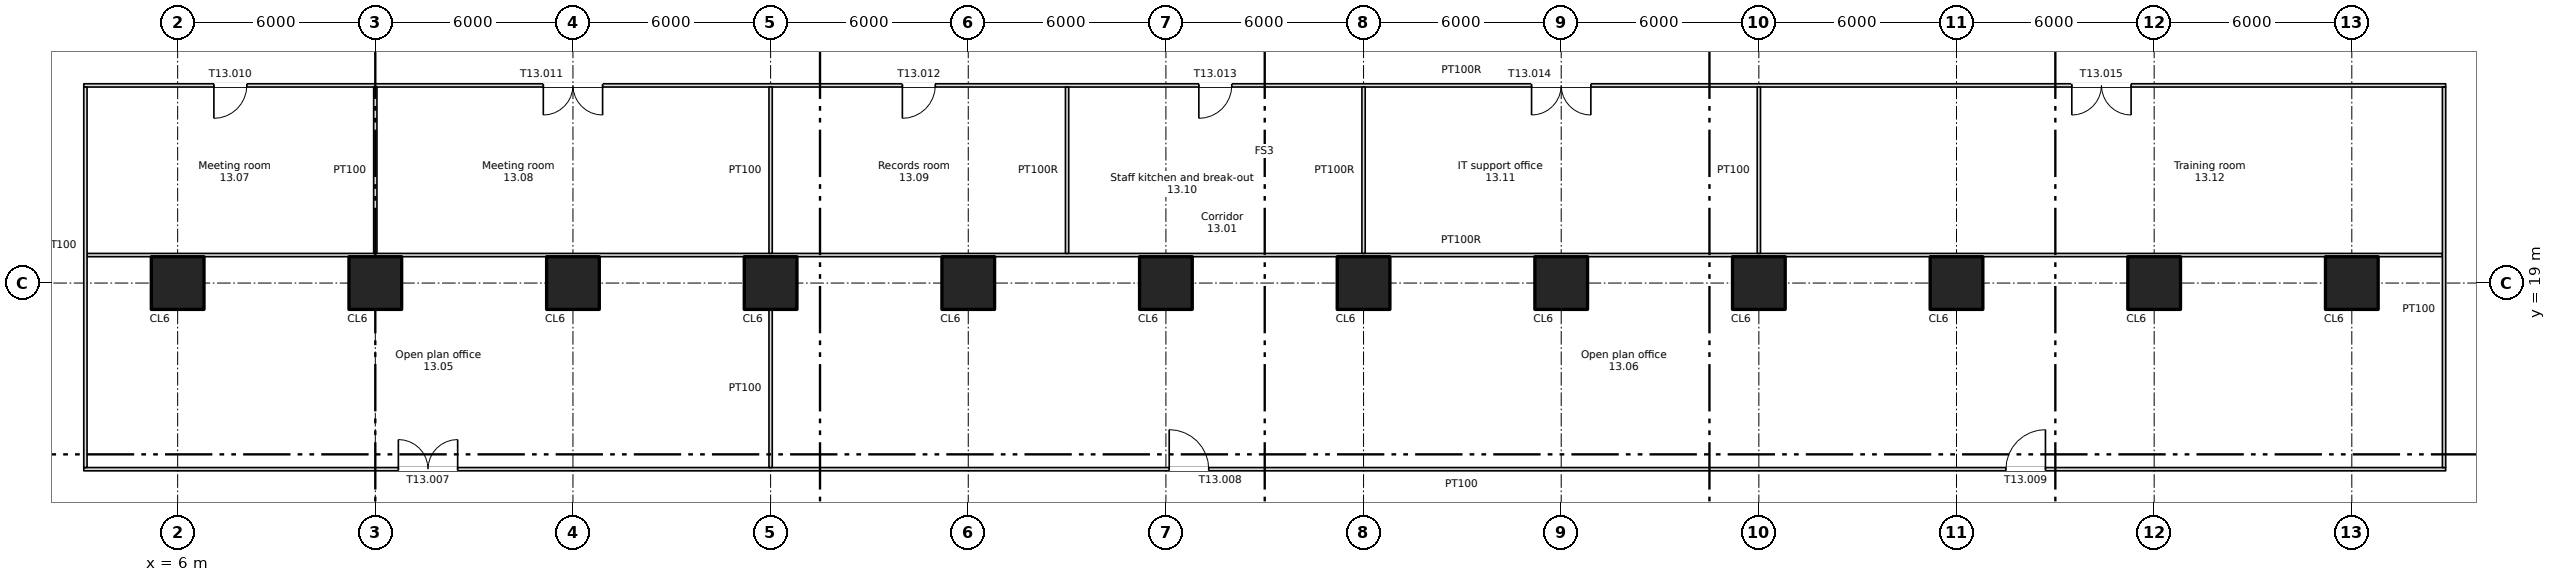
"""IFC4 building model, lengths in metres.
Left out: names, types, materials, properties, quantities, classifications, styles, units other than length and angle.
Written with IfcOpenShell. Run it as: python <this file> out.ifc"""

import sys

from ifc_helpers import new_model, si_unit, direction, frame, frame_2d, origin, origin_2d, place, context, subcontext, project, spatial, rectangle, extrude, element, fill, save


model = new_model("IFC4")
c1 = context("Model", 3, precision=1e-05, world=origin(), true_north=direction((0.0, 1.0)))
c2 = subcontext(c1, "Body", "Model", "MODEL_VIEW")
j1 = project(units=[si_unit("LENGTHUNIT", "METRE"), si_unit("PLANEANGLEUNIT", "RADIAN")], contexts=[c1])
p1 = place(None, origin())
s1 = spatial("IfcSite", under=j1, at=p1, CompositionType="ELEMENT")
p2 = place(p1, origin())
s2 = spatial("IfcBuilding", under=s1, at=p2, CompositionType="ELEMENT")
p3 = place(p2, frame((0.0, 0.0, 67.5)))
s3 = spatial("IfcBuildingStorey", under=s2, at=p3, CompositionType="ELEMENT", Elevation=67.5)
for number, where, z_axis, x_axis in (
    (1, (6.0, 19.0, 0.0), (0.0, 0.0, 1.0), (1.0, 0.0, 0.0)),
    (2, (12.0, 19.0, 0.0), (0.0, 0.0, 1.0), (1.0, 0.0, 0.0)),
    (3, (18.0, 19.0, 0.0), (0.0, 0.0, 1.0), (1.0, 0.0, 0.0)),
    (4, (24.0, 19.0, 0.0), (0.0, 0.0, 1.0), (1.0, 0.0, 0.0)),
    (5, (30.0, 19.0, 0.0), (0.0, 0.0, 1.0), (1.0, 0.0, 0.0)),
    (6, (36.0, 19.0, 0.0), (0.0, 0.0, 1.0), (1.0, 0.0, 0.0)),
    (7, (42.0, 19.0, 0.0), (0.0, 0.0, 1.0), (1.0, 0.0, 0.0)),
    (8, (48.0, 19.0, 0.0), (0.0, 0.0, 1.0), (1.0, 0.0, 0.0)),
    (9, (54.0, 19.0, 0.0), (0.0, 0.0, 1.0), (1.0, 0.0, 0.0)),
    (10, (60.0, 19.0, 0.0), (0.0, 0.0, 1.0), (1.0, 0.0, 0.0)),
    (11, (66.0, 19.0, 0.0), (0.0, 0.0, 1.0), (1.0, 0.0, 0.0)),
    (12, (72.0, 19.0, 0.0), (0.0, 0.0, 1.0), (1.0, 0.0, 0.0)),
):
    element("IfcColumn", number, at=place(p3, frame(where, z_axis=z_axis, x_axis=x_axis)), inside=s3, PredefinedType="COLUMN", context=c2, shape_type="SweptSolid", body=[
        extrude(rectangle(XDim=1.6, YDim=1.6, at=origin_2d()), origin(), (0.0, 0.0, 1.0), 3.35),
    ])
p4 = place(p3, frame((3.15, 13.35, 0.0), z_axis=(0.0, 0.0, 1.0), x_axis=(1.0, 0.0, 0.0)))
e13 = element("IfcWall", 13, at=p4, inside=s3, PredefinedType="PARTITIONING", context=c2, shape_type="SweptSolid", body=[
    extrude(rectangle(XDim=71.7, YDim=0.1, at=frame_2d((35.85, 0.0))), origin(), (0.0, 0.0, 1.0), 3.35),
])
p5 = place(p4, frame((9.55, 0.0, 0.0)))
e14 = element("IfcOpeningElement", 14, at=p5, cuts=e13, PredefinedType="OPENING", context=c2, shape_type="SweptSolid", body=[
    extrude(rectangle(XDim=1.8, YDim=2.1, at=frame_2d((0.9, 1.05))), frame((0.0, 0.06, 0.0), z_axis=(0.0, -1.0, 0.0), x_axis=(1.0, 0.0, 0.0)), (0.0, 0.0, 1.0), 0.12),
])
p6 = place(p4, frame((32.95, 0.0, 0.0)))
e15 = element("IfcOpeningElement", 15, at=p6, cuts=e13, PredefinedType="OPENING", context=c2, shape_type="SweptSolid", body=[
    extrude(rectangle(XDim=1.2, YDim=2.1, at=frame_2d((0.6, 1.05))), frame((0.0, 0.06, 0.0), z_axis=(0.0, -1.0, 0.0), x_axis=(1.0, 0.0, 0.0)), (0.0, 0.0, 1.0), 0.12),
])
p7 = place(p4, frame((58.35, 0.0, 0.0)))
e16 = element("IfcOpeningElement", 16, at=p7, cuts=e13, PredefinedType="OPENING", context=c2, shape_type="SweptSolid", body=[
    extrude(rectangle(XDim=1.2, YDim=2.1, at=frame_2d((0.6, 1.05))), frame((0.0, 0.06, 0.0), z_axis=(0.0, -1.0, 0.0), x_axis=(1.0, 0.0, 0.0)), (0.0, 0.0, 1.0), 0.12),
])
p8 = place(p3, frame((3.25, 19.85, 0.0), z_axis=(0.0, 0.0, 1.0), x_axis=(1.0, 0.0, 0.0)))
e17 = element("IfcWall", 17, at=p8, inside=s3, PredefinedType="PARTITIONING", context=c2, shape_type="SweptSolid", body=[
    extrude(rectangle(XDim=71.5, YDim=0.1, at=frame_2d((35.75, 0.0))), origin(), (0.0, 0.0, 1.0), 3.35),
])
p9 = place(p3, frame((3.15, 25.0, 0.0), z_axis=(0.0, 0.0, 1.0), x_axis=(1.0, 0.0, 0.0)))
e18 = element("IfcWall", 18, at=p9, inside=s3, PredefinedType="PARTITIONING", context=c2, shape_type="SweptSolid", body=[
    extrude(rectangle(XDim=71.7, YDim=0.1, at=frame_2d((35.85, 0.0))), origin(), (0.0, 0.0, 1.0), 3.35),
])
p10 = place(p9, frame((3.95, 0.0, 0.0)))
e19 = element("IfcOpeningElement", 19, at=p10, cuts=e18, PredefinedType="OPENING", context=c2, shape_type="SweptSolid", body=[
    extrude(rectangle(XDim=1.0, YDim=2.1, at=frame_2d((0.5, 1.05))), frame((0.0, 0.06, 0.0), z_axis=(0.0, -1.0, 0.0), x_axis=(1.0, 0.0, 0.0)), (0.0, 0.0, 1.0), 0.12),
])
p11 = place(p9, frame((13.95, 0.0, 0.0)))
e20 = element("IfcOpeningElement", 20, at=p11, cuts=e18, PredefinedType="OPENING", context=c2, shape_type="SweptSolid", body=[
    extrude(rectangle(XDim=1.8, YDim=2.1, at=frame_2d((0.9, 1.05))), frame((0.0, 0.06, 0.0), z_axis=(0.0, -1.0, 0.0), x_axis=(1.0, 0.0, 0.0)), (0.0, 0.0, 1.0), 0.12),
])
p12 = place(p9, frame((24.85, 0.0, 0.0)))
e21 = element("IfcOpeningElement", 21, at=p12, cuts=e18, PredefinedType="OPENING", context=c2, shape_type="SweptSolid", body=[
    extrude(rectangle(XDim=1.0, YDim=2.1, at=frame_2d((0.5, 1.05))), frame((0.0, 0.06, 0.0), z_axis=(0.0, -1.0, 0.0), x_axis=(1.0, 0.0, 0.0)), (0.0, 0.0, 1.0), 0.12),
])
p13 = place(p9, frame((33.85, 0.0, 0.0)))
e22 = element("IfcOpeningElement", 22, at=p13, cuts=e18, PredefinedType="OPENING", context=c2, shape_type="SweptSolid", body=[
    extrude(rectangle(XDim=1.0, YDim=2.1, at=frame_2d((0.5, 1.05))), frame((0.0, 0.06, 0.0), z_axis=(0.0, -1.0, 0.0), x_axis=(1.0, 0.0, 0.0)), (0.0, 0.0, 1.0), 0.12),
])
p14 = place(p9, frame((43.95, 0.0, 0.0)))
e23 = element("IfcOpeningElement", 23, at=p14, cuts=e18, PredefinedType="OPENING", context=c2, shape_type="SweptSolid", body=[
    extrude(rectangle(XDim=1.8, YDim=2.1, at=frame_2d((0.9, 1.05))), frame((0.0, 0.06, 0.0), z_axis=(0.0, -1.0, 0.0), x_axis=(1.0, 0.0, 0.0)), (0.0, 0.0, 1.0), 0.12),
])
p15 = place(p9, frame((60.35, 0.0, 0.0)))
e24 = element("IfcOpeningElement", 24, at=p15, cuts=e18, PredefinedType="OPENING", context=c2, shape_type="SweptSolid", body=[
    extrude(rectangle(XDim=1.8, YDim=2.1, at=frame_2d((0.9, 1.05))), frame((0.0, 0.06, 0.0), z_axis=(0.0, -1.0, 0.0), x_axis=(1.0, 0.0, 0.0)), (0.0, 0.0, 1.0), 0.12),
])
p16 = place(p3, frame((3.2, 13.4, 0.0), z_axis=(0.0, 0.0, 1.0), x_axis=(0.0, 1.0, 0.0)))
e25 = element("IfcWall", 25, at=p16, inside=s3, PredefinedType="PARTITIONING", context=c2, shape_type="SweptSolid", body=[
    extrude(rectangle(XDim=11.55, YDim=0.1, at=frame_2d((5.775, 0.0))), origin(), (0.0, 0.0, 1.0), 3.35),
])
p17 = place(p3, frame((12.0, 19.9, 0.0), z_axis=(0.0, 0.0, 1.0), x_axis=(0.0, 1.0, 0.0)))
e26 = element("IfcWall", 26, at=p17, inside=s3, PredefinedType="PARTITIONING", context=c2, shape_type="SweptSolid", body=[
    extrude(rectangle(XDim=5.05, YDim=0.1, at=frame_2d((2.525, 0.0))), origin(), (0.0, 0.0, 1.0), 3.35),
])
p18 = place(p3, frame((24.0, 13.4, 0.0), z_axis=(0.0, 0.0, 1.0), x_axis=(0.0, 1.0, 0.0)))
e27 = element("IfcWall", 27, at=p18, inside=s3, PredefinedType="PARTITIONING", context=c2, shape_type="SweptSolid", body=[
    extrude(rectangle(XDim=4.8, YDim=0.1, at=frame_2d((2.4, 0.0))), origin(), (0.0, 0.0, 1.0), 3.35),
])
for number, where, z_axis, x_axis in (
    (28, (24.0, 19.9, 0.0), (0.0, 0.0, 1.0), (0.0, 1.0, 0.0)),
    (29, (33.0, 19.9, 0.0), (0.0, 0.0, 1.0), (0.0, 1.0, 0.0)),
    (30, (42.0, 19.9, 0.0), (0.0, 0.0, 1.0), (0.0, 1.0, 0.0)),
    (31, (54.0, 19.9, 0.0), (0.0, 0.0, 1.0), (0.0, 1.0, 0.0)),
):
    element("IfcWall", number, at=place(p3, frame(where, z_axis=z_axis, x_axis=x_axis)), inside=s3, PredefinedType="PARTITIONING", context=c2, shape_type="SweptSolid", body=[
        extrude(rectangle(XDim=5.05, YDim=0.1, at=frame_2d((2.525, 0.0))), origin(), (0.0, 0.0, 1.0), 3.35),
    ])
p19 = place(p3, frame((74.8, 13.4, 0.0), z_axis=(0.0, 0.0, 1.0), x_axis=(0.0, 1.0, 0.0)))
e32 = element("IfcWall", 32, at=p19, inside=s3, PredefinedType="PARTITIONING", context=c2, shape_type="SweptSolid", body=[
    extrude(rectangle(XDim=11.55, YDim=0.1, at=frame_2d((5.775, 0.0))), origin(), (0.0, 0.0, 1.0), 3.35),
])
p20 = place(p5, origin())
e33 = element("IfcDoor", 33, at=p20, inside=s3, OperationType="DOUBLE_DOOR_SINGLE_SWING", PredefinedType="DOOR", context=c2, shape_type="SweptSolid", body=[
    extrude(rectangle(XDim=1.8, YDim=2.1, at=frame_2d((0.9, 1.05))), frame((0.0, 0.025, 0.0), z_axis=(0.0, -1.0, 0.0), x_axis=(1.0, 0.0, 0.0)), (0.0, 0.0, 1.0), 0.05),
])
fill(e14, e33)
p21 = place(p6, origin())
e34 = element("IfcDoor", 34, at=p21, inside=s3, OperationType="SINGLE_SWING_LEFT", PredefinedType="DOOR", context=c2, shape_type="SweptSolid", body=[
    extrude(rectangle(XDim=1.2, YDim=2.1, at=frame_2d((0.6, 1.05))), frame((0.0, 0.025, 0.0), z_axis=(0.0, -1.0, 0.0), x_axis=(1.0, 0.0, 0.0)), (0.0, 0.0, 1.0), 0.05),
])
fill(e15, e34)
p22 = place(p7, origin())
e35 = element("IfcDoor", 35, at=p22, inside=s3, OperationType="SINGLE_SWING_RIGHT", PredefinedType="DOOR", context=c2, shape_type="SweptSolid", body=[
    extrude(rectangle(XDim=1.2, YDim=2.1, at=frame_2d((0.6, 1.05))), frame((0.0, 0.025, 0.0), z_axis=(0.0, -1.0, 0.0), x_axis=(1.0, 0.0, 0.0)), (0.0, 0.0, 1.0), 0.05),
])
fill(e16, e35)
p23 = place(p10, origin())
e36 = element("IfcDoor", 36, at=p23, inside=s3, OperationType="SINGLE_SWING_LEFT", PredefinedType="DOOR", context=c2, shape_type="SweptSolid", body=[
    extrude(rectangle(XDim=1.0, YDim=2.1, at=frame_2d((0.5, 1.05))), frame((0.0, 0.025, 0.0), z_axis=(0.0, -1.0, 0.0), x_axis=(1.0, 0.0, 0.0)), (0.0, 0.0, 1.0), 0.05),
])
fill(e19, e36)
p24 = place(p11, origin())
e37 = element("IfcDoor", 37, at=p24, inside=s3, OperationType="DOUBLE_DOOR_SINGLE_SWING", PredefinedType="DOOR", context=c2, shape_type="SweptSolid", body=[
    extrude(rectangle(XDim=1.8, YDim=2.1, at=frame_2d((0.9, 1.05))), frame((0.0, 0.025, 0.0), z_axis=(0.0, -1.0, 0.0), x_axis=(1.0, 0.0, 0.0)), (0.0, 0.0, 1.0), 0.05),
])
fill(e20, e37)
p25 = place(p12, origin())
e38 = element("IfcDoor", 38, at=p25, inside=s3, OperationType="SINGLE_SWING_LEFT", PredefinedType="DOOR", context=c2, shape_type="SweptSolid", body=[
    extrude(rectangle(XDim=1.0, YDim=2.1, at=frame_2d((0.5, 1.05))), frame((0.0, 0.025, 0.0), z_axis=(0.0, -1.0, 0.0), x_axis=(1.0, 0.0, 0.0)), (0.0, 0.0, 1.0), 0.05),
])
fill(e21, e38)
p26 = place(p13, origin())
e39 = element("IfcDoor", 39, at=p26, inside=s3, OperationType="SINGLE_SWING_LEFT", PredefinedType="DOOR", context=c2, shape_type="SweptSolid", body=[
    extrude(rectangle(XDim=1.0, YDim=2.1, at=frame_2d((0.5, 1.05))), frame((0.0, 0.025, 0.0), z_axis=(0.0, -1.0, 0.0), x_axis=(1.0, 0.0, 0.0)), (0.0, 0.0, 1.0), 0.05),
])
fill(e22, e39)
p27 = place(p14, origin())
e40 = element("IfcDoor", 40, at=p27, inside=s3, OperationType="DOUBLE_DOOR_SINGLE_SWING", PredefinedType="DOOR", context=c2, shape_type="SweptSolid", body=[
    extrude(rectangle(XDim=1.8, YDim=2.1, at=frame_2d((0.9, 1.05))), frame((0.0, 0.025, 0.0), z_axis=(0.0, -1.0, 0.0), x_axis=(1.0, 0.0, 0.0)), (0.0, 0.0, 1.0), 0.05),
])
fill(e23, e40)
p28 = place(p15, origin())
e41 = element("IfcDoor", 41, at=p28, inside=s3, OperationType="DOUBLE_DOOR_SINGLE_SWING", PredefinedType="DOOR", context=c2, shape_type="SweptSolid", body=[
    extrude(rectangle(XDim=1.8, YDim=2.1, at=frame_2d((0.9, 1.05))), frame((0.0, 0.025, 0.0), z_axis=(0.0, -1.0, 0.0), x_axis=(1.0, 0.0, 0.0)), (0.0, 0.0, 1.0), 0.05),
])
fill(e24, e41)
save(model, sys.argv[1])
